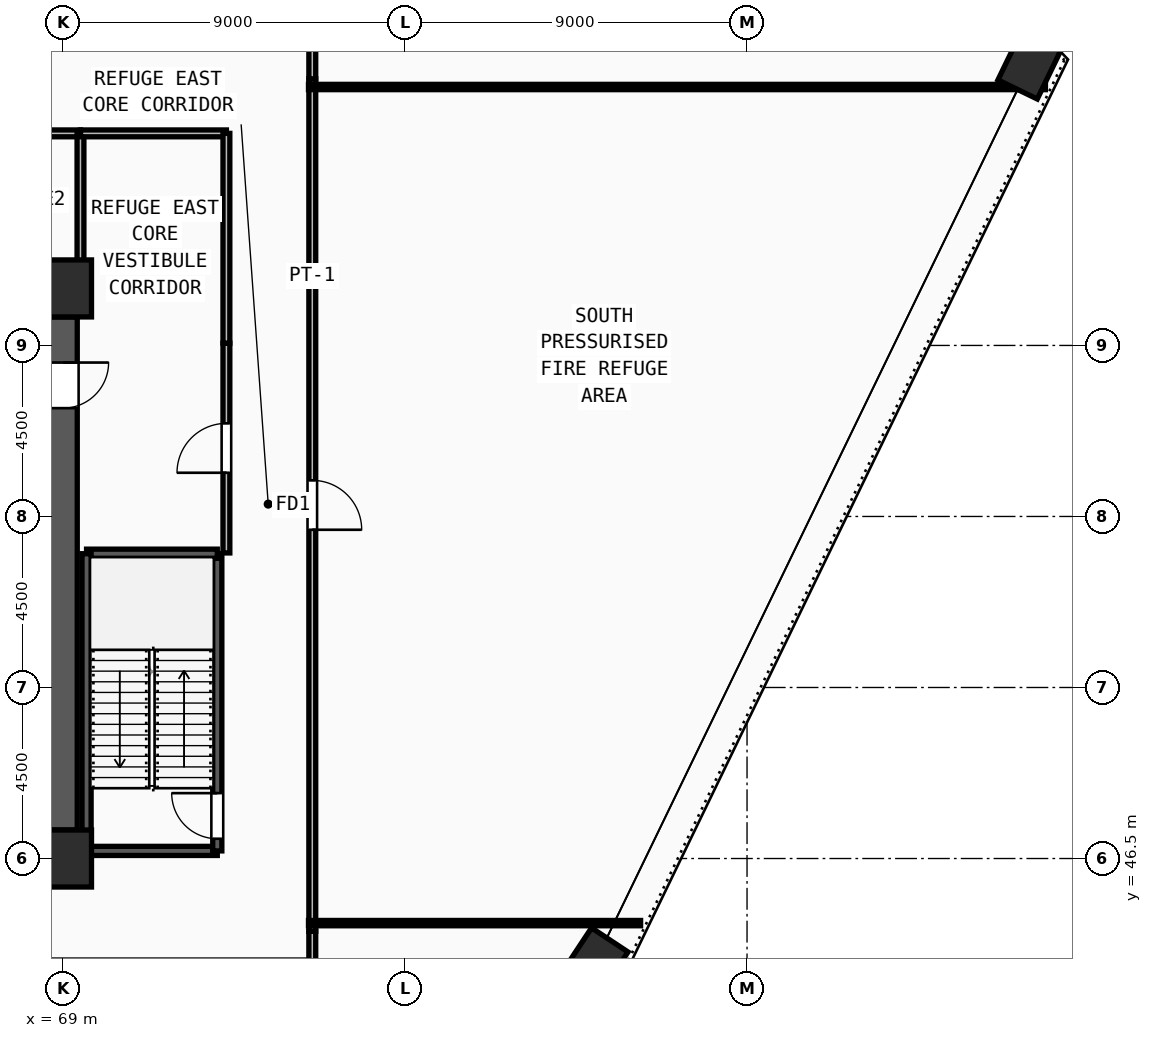
"""IFC4 building model, lengths in metres.
Left out: names, types, materials, properties, quantities, classifications, styles, units other than length and angle.
Written with IfcOpenShell. Run it as: python <this file> out.ifc"""

import sys

from ifc_helpers import new_model, si_unit, direction, frame, frame_2d, origin, origin_2d, place, context, subcontext, project, spatial, rectangle, extrude, source, transform, mapped, element, fill, save


model = new_model("IFC4")
c1 = context("Model", 3, precision=1e-05, world=origin(), true_north=direction((0.0, 1.0)))
c2 = subcontext(c1, "Body", "Model", "MODEL_VIEW")
j1 = project(units=[si_unit("LENGTHUNIT", "METRE"), si_unit("PLANEANGLEUNIT", "RADIAN")], contexts=[c1])
p1 = place(None, origin())
s1 = spatial("IfcSite", under=j1, at=p1, CompositionType="ELEMENT")
p2 = place(p1, origin())
s2 = spatial("IfcBuilding", under=s1, at=p2, CompositionType="ELEMENT")
p3 = place(p2, frame((0.0, 0.0, 185.25)))
s3 = spatial("IfcBuildingStorey", under=s2, at=p3, CompositionType="ELEMENT", Elevation=185.25)
m1 = source(origin(), c2, "Body", "SweptSolid", [
    extrude(rectangle(XDim=1.5, YDim=1.5, at=origin_2d()), origin(), (0.0, 0.0, 1.0), 4.5),
])
for number, where, z_axis, x_axis in (
    (1, (69.0, 46.5, 0.0), (0.0, 0.0, 1.0), (1.0, 0.0, 0.0)),
    (2, (69.0, 61.5, 0.0), (0.0, 0.0, 1.0), (1.0, 0.0, 0.0)),
):
    element("IfcColumn", number, at=place(p3, frame(where, z_axis=z_axis, x_axis=x_axis)), inside=s3, PredefinedType="COLUMN", context=c2, shape_type="MappedRepresentation", body=[
        mapped(m1, transform((0.0, 0.0, 0.0), x_axis=(1.0, 0.0, 0.0), y_axis=(0.0, 1.0, 0.0), z_axis=(0.0, 0.0, 1.0), scale=1.0)),
    ])
m2 = source(origin(), c2, "Body", "SweptSolid", [
    extrude(rectangle(XDim=1.4, YDim=1.15, at=origin_2d()), origin(), (0.0, 0.0, 1.0), 4.5),
])
for number, where, z_axis, x_axis in (
    (3, (94.425, 67.365, 0.0), (0.0, 0.0, 1.0), (0.436, 0.9, 0.0)),
    (4, (83.002, 43.774, 0.0), (0.0, 0.0, 1.0), (0.552, 0.834, 0.0)),
):
    element("IfcColumn", number, at=place(p3, frame(where, z_axis=z_axis, x_axis=x_axis)), inside=s3, PredefinedType="COLUMN", context=c2, shape_type="MappedRepresentation", body=[
        mapped(m2, transform((0.0, 0.0, 0.0), x_axis=(1.0, 0.0, 0.0), y_axis=(0.0, 1.0, 0.0), z_axis=(0.0, 0.0, 1.0), scale=1.0)),
    ])
p4 = place(p3, frame((69.0, 60.75, 0.0), z_axis=(0.0, 0.0, 1.0), x_axis=(0.0, -1.0, 0.0)))
e5 = element("IfcWall", 5, at=p4, inside=s3, PredefinedType="SHEAR", context=c2, shape_type="SweptSolid", body=[
    extrude(rectangle(XDim=13.5, YDim=0.75, at=frame_2d((6.75, 0.0))), origin(), (0.0, 0.0, 1.0), 4.22),
])
m3 = source(origin(), c2, "Body", "SweptSolid", [
    extrude(rectangle(XDim=1.2, YDim=2.2, at=frame_2d((0.6, 1.1))), frame((0.0, 0.385, 0.0), z_axis=(0.0, -1.0, 0.0), x_axis=(1.0, 0.0, 0.0)), (0.0, 0.0, 1.0), 0.77),
])
p5 = place(p4, frame((1.2, 0.0, 0.0)))
e6 = element("IfcOpeningElement", 6, at=p5, cuts=e5, PredefinedType="OPENING", context=c2, shape_type="MappedRepresentation", body=[
    mapped(m3, transform((0.0, 0.0, 0.0), x_axis=(1.0, 0.0, 0.0), y_axis=(0.0, 1.0, 0.0), z_axis=(0.0, 0.0, 1.0), scale=1.0)),
])
p6 = place(p3, frame((69.62, 46.7, 0.0), z_axis=(0.0, 0.0, 1.0), x_axis=(1.0, 0.0, 0.0)))
e7 = element("IfcWall", 7, at=p6, inside=s3, PredefinedType="SOLIDWALL", context=c2, shape_type="SweptSolid", body=[
    extrude(rectangle(XDim=3.44, YDim=0.24, at=frame_2d((1.72, 0.0))), origin(), (0.0, 0.0, 1.0), 4.22),
])
p7 = place(p3, frame((73.06, 46.7, 0.0), z_axis=(0.0, 0.0, 1.0), x_axis=(0.0, 1.0, 0.0)))
e8 = element("IfcWall", 8, at=p7, inside=s3, PredefinedType="SOLIDWALL", context=c2, shape_type="SweptSolid", body=[
    extrude(rectangle(XDim=7.82, YDim=0.24, at=frame_2d((3.91, 0.0))), origin(), (0.0, 0.0, 1.0), 4.22),
])
m4 = source(origin(), c2, "Body", "SweptSolid", [
    extrude(rectangle(XDim=1.2, YDim=2.2, at=frame_2d((0.6, 1.1))), frame((0.0, 0.13, 0.0), z_axis=(0.0, -1.0, 0.0), x_axis=(1.0, 0.0, 0.0)), (0.0, 0.0, 1.0), 0.26),
])
p8 = place(p7, frame((0.32, 0.0, 0.0)))
e9 = element("IfcOpeningElement", 9, at=p8, cuts=e8, PredefinedType="OPENING", context=c2, shape_type="MappedRepresentation", body=[
    mapped(m4, transform((0.0, 0.0, 0.0), x_axis=(1.0, 0.0, 0.0), y_axis=(0.0, 1.0, 0.0), z_axis=(0.0, 0.0, 1.0), scale=1.0)),
])
p9 = place(p3, frame((73.06, 54.52, 0.0), z_axis=(0.0, 0.0, 1.0), x_axis=(-1.0, 0.0, 0.0)))
e10 = element("IfcWall", 10, at=p9, inside=s3, PredefinedType="SOLIDWALL", context=c2, shape_type="SweptSolid", body=[
    extrude(rectangle(XDim=3.44, YDim=0.24, at=frame_2d((1.72, 0.0))), origin(), (0.0, 0.0, 1.0), 4.22),
])
p10 = place(p3, frame((69.62, 54.52, 0.0), z_axis=(0.0, 0.0, 1.0), x_axis=(0.0, -1.0, 0.0)))
e11 = element("IfcWall", 11, at=p10, inside=s3, PredefinedType="SOLIDWALL", context=c2, shape_type="SweptSolid", body=[
    extrude(rectangle(XDim=7.82, YDim=0.24, at=frame_2d((3.91, 0.0))), origin(), (0.0, 0.0, 1.0), 4.22),
])
p11 = place(p3, frame((65.92, 65.58, 0.0), z_axis=(0.0, 0.0, 1.0), x_axis=(1.0, 0.0, 0.0)))
e12 = element("IfcWall", 12, at=p11, inside=s3, PredefinedType="PARTITIONING", context=c2, shape_type="SweptSolid", body=[
    extrude(rectangle(XDim=3.54, YDim=0.18, at=frame_2d((1.77, 0.0))), origin(), (0.0, 0.0, 1.0), 4.22),
])
m5 = source(origin(), c2, "Body", "SweptSolid", [
    extrude(rectangle(XDim=1.0, YDim=2.2, at=frame_2d((0.5, 1.1))), frame((0.0, 0.1, 0.0), z_axis=(0.0, -1.0, 0.0), x_axis=(1.0, 0.0, 0.0)), (0.0, 0.0, 1.0), 0.2),
])
p12 = place(p11, frame((1.27, 0.0, 0.0)))
e13 = element("IfcOpeningElement", 13, at=p12, cuts=e12, PredefinedType="OPENING", context=c2, shape_type="MappedRepresentation", body=[
    mapped(m5, transform((0.0, 0.0, 0.0), x_axis=(1.0, 0.0, 0.0), y_axis=(0.0, 1.0, 0.0), z_axis=(0.0, 0.0, 1.0), scale=1.0)),
])
p13 = place(p3, frame((73.3, 54.54, 0.0), z_axis=(0.0, 0.0, 1.0), x_axis=(0.0, 1.0, 0.0)))
e14 = element("IfcWall", 14, at=p13, inside=s3, PredefinedType="PARTITIONING", context=c2, shape_type="SweptSolid", body=[
    extrude(rectangle(XDim=5.52, YDim=0.18, at=frame_2d((2.76, 0.0))), origin(), (0.0, 0.0, 1.0), 4.22),
])
m6 = source(origin(), c2, "Body", "SweptSolid", [
    extrude(rectangle(XDim=1.3, YDim=2.2, at=frame_2d((0.65, 1.1))), frame((0.0, 0.1, 0.0), z_axis=(0.0, -1.0, 0.0), x_axis=(1.0, 0.0, 0.0)), (0.0, 0.0, 1.0), 0.2),
])
p14 = place(p13, frame((2.11, 0.0, 0.0)))
e15 = element("IfcOpeningElement", 15, at=p14, cuts=e14, PredefinedType="OPENING", context=c2, shape_type="MappedRepresentation", body=[
    mapped(m6, transform((0.0, 0.0, 0.0), x_axis=(1.0, 0.0, 0.0), y_axis=(0.0, 1.0, 0.0), z_axis=(0.0, 0.0, 1.0), scale=1.0)),
])
p15 = place(p3, frame((75.56, 67.015, 0.0), z_axis=(0.0, 0.0, 1.0), x_axis=(0.0, -1.0, 0.0)))
e16 = element("IfcWall", 16, at=p15, inside=s3, PredefinedType="PARTITIONING", context=c2, shape_type="SweptSolid", body=[
    extrude(rectangle(XDim=22.43, YDim=0.18, at=frame_2d((11.215, 0.0))), origin(), (0.0, 0.0, 1.0), 3.805),
])
p16 = place(p15, frame((10.565, 0.0, 0.0)))
e17 = element("IfcOpeningElement", 17, at=p16, cuts=e16, PredefinedType="OPENING", context=c2, shape_type="MappedRepresentation", body=[
    mapped(m6, transform((0.0, 0.0, 0.0), x_axis=(1.0, 0.0, 0.0), y_axis=(0.0, 1.0, 0.0), z_axis=(0.0, 0.0, 1.0), scale=1.0)),
])
p17 = place(p3, frame((69.46, 61.95, 0.0), z_axis=(0.0, 0.0, 1.0), x_axis=(0.0, 1.0, 0.0)))
e18 = element("IfcWall", 18, at=p17, inside=s3, PredefinedType="PARTITIONING", context=c2, shape_type="SweptSolid", body=[
    extrude(rectangle(XDim=3.63, YDim=0.18, at=frame_2d((1.815, 0.0))), origin(), (0.0, 0.0, 1.0), 4.22),
])
p18 = place(p3, frame((69.46, 65.58, 0.0), z_axis=(0.0, 0.0, 1.0), x_axis=(1.0, 0.0, 0.0)))
e19 = element("IfcWall", 19, at=p18, inside=s3, PredefinedType="PARTITIONING", context=c2, shape_type="SweptSolid", body=[
    extrude(rectangle(XDim=3.84, YDim=0.18, at=frame_2d((1.92, 0.0))), origin(), (0.0, 0.0, 1.0), 4.22),
])
p19 = place(p3, frame((73.3, 60.06, 0.0), z_axis=(0.0, 0.0, 1.0), x_axis=(0.0, 1.0, 0.0)))
e20 = element("IfcWall", 20, at=p19, inside=s3, PredefinedType="PARTITIONING", context=c2, shape_type="SweptSolid", body=[
    extrude(rectangle(XDim=5.52, YDim=0.18, at=frame_2d((2.76, 0.0))), origin(), (0.0, 0.0, 1.0), 4.22),
])
p20 = place(p3, frame((75.56, 67.98, 0.0), z_axis=(0.0, 0.0, 1.0), x_axis=(0.0, -1.0, 0.0)))
e21 = element("IfcWall", 21, at=p20, inside=s3, PredefinedType="PARTITIONING", context=c2, shape_type="SweptSolid", body=[
    extrude(rectangle(XDim=0.965, YDim=0.18, at=frame_2d((0.482, 0.0))), origin(), (0.0, 0.0, 1.0), 4.22),
])
p21 = place(p3, frame((75.56, 44.585, 0.0), z_axis=(0.0, 0.0, 1.0), x_axis=(0.0, -1.0, 0.0)))
e22 = element("IfcWall", 22, at=p21, inside=s3, PredefinedType="PARTITIONING", context=c2, shape_type="SweptSolid", body=[
    extrude(rectangle(XDim=0.915, YDim=0.18, at=frame_2d((0.458, 0.0))), origin(), (0.0, 0.0, 1.0), 4.22),
])
p22 = place(p3, frame((75.46, 44.8, 0.0), z_axis=(0.0, 0.0, 1.0), x_axis=(1.0, 0.0, 0.0)))
e23 = element("IfcWall", 23, at=p22, inside=s3, PredefinedType="PARTITIONING", context=c2, shape_type="SweptSolid", body=[
    extrude(rectangle(XDim=8.739, YDim=0.14, at=frame_2d((4.37, 0.0))), origin(), (0.0, 0.0, 1.0), 4.22),
])
p23 = place(p3, frame((75.46, 66.8, 0.0), z_axis=(0.0, 0.0, 1.0), x_axis=(1.0, 0.0, 0.0)))
e24 = element("IfcWall", 24, at=p23, inside=s3, PredefinedType="PARTITIONING", context=c2, shape_type="SweptSolid", body=[
    extrude(rectangle(XDim=19.392, YDim=0.14, at=frame_2d((9.696, 0.0))), origin(), (0.0, 0.0, 1.0), 3.405),
])
m7 = source(origin(), c2, "Body", "SweptSolid", [
    extrude(rectangle(XDim=1.2, YDim=2.2, at=frame_2d((0.6, 1.1))), frame((0.0, 0.025, 0.0), z_axis=(0.0, -1.0, 0.0), x_axis=(1.0, 0.0, 0.0)), (0.0, 0.0, 1.0), 0.05),
])
p24 = place(p5, origin())
e25 = element("IfcDoor", 25, at=p24, inside=s3, OperationType="SINGLE_SWING_LEFT", PredefinedType="DOOR", context=c2, shape_type="MappedRepresentation", body=[
    mapped(m7, transform((0.0, 0.0, 0.0), x_axis=(1.0, 0.0, 0.0), y_axis=(0.0, 1.0, 0.0), z_axis=(0.0, 0.0, 1.0), scale=1.0)),
])
fill(e6, e25)
p25 = place(p8, origin())
e26 = element("IfcDoor", 26, at=p25, inside=s3, OperationType="SINGLE_SWING_RIGHT", PredefinedType="DOOR", context=c2, shape_type="MappedRepresentation", body=[
    mapped(m7, transform((0.0, 0.0, 0.0), x_axis=(1.0, 0.0, 0.0), y_axis=(0.0, 1.0, 0.0), z_axis=(0.0, 0.0, 1.0), scale=1.0)),
])
fill(e9, e26)
m8 = source(origin(), c2, "Body", "SweptSolid", [
    extrude(rectangle(XDim=1.3, YDim=2.2, at=frame_2d((0.65, 1.1))), frame((0.0, 0.025, 0.0), z_axis=(0.0, -1.0, 0.0), x_axis=(1.0, 0.0, 0.0)), (0.0, 0.0, 1.0), 0.05),
])
p26 = place(p14, origin())
e27 = element("IfcDoor", 27, at=p26, inside=s3, OperationType="SINGLE_SWING_LEFT", PredefinedType="DOOR", context=c2, shape_type="MappedRepresentation", body=[
    mapped(m8, transform((0.0, 0.0, 0.0), x_axis=(1.0, 0.0, 0.0), y_axis=(0.0, 1.0, 0.0), z_axis=(0.0, 0.0, 1.0), scale=1.0)),
])
fill(e15, e27)
p27 = place(p16, origin())
e28 = element("IfcDoor", 28, at=p27, inside=s3, OperationType="SINGLE_SWING_RIGHT", PredefinedType="DOOR", context=c2, shape_type="MappedRepresentation", body=[
    mapped(m8, transform((0.0, 0.0, 0.0), x_axis=(1.0, 0.0, 0.0), y_axis=(0.0, 1.0, 0.0), z_axis=(0.0, 0.0, 1.0), scale=1.0)),
])
fill(e17, e28)
save(model, sys.argv[1])
